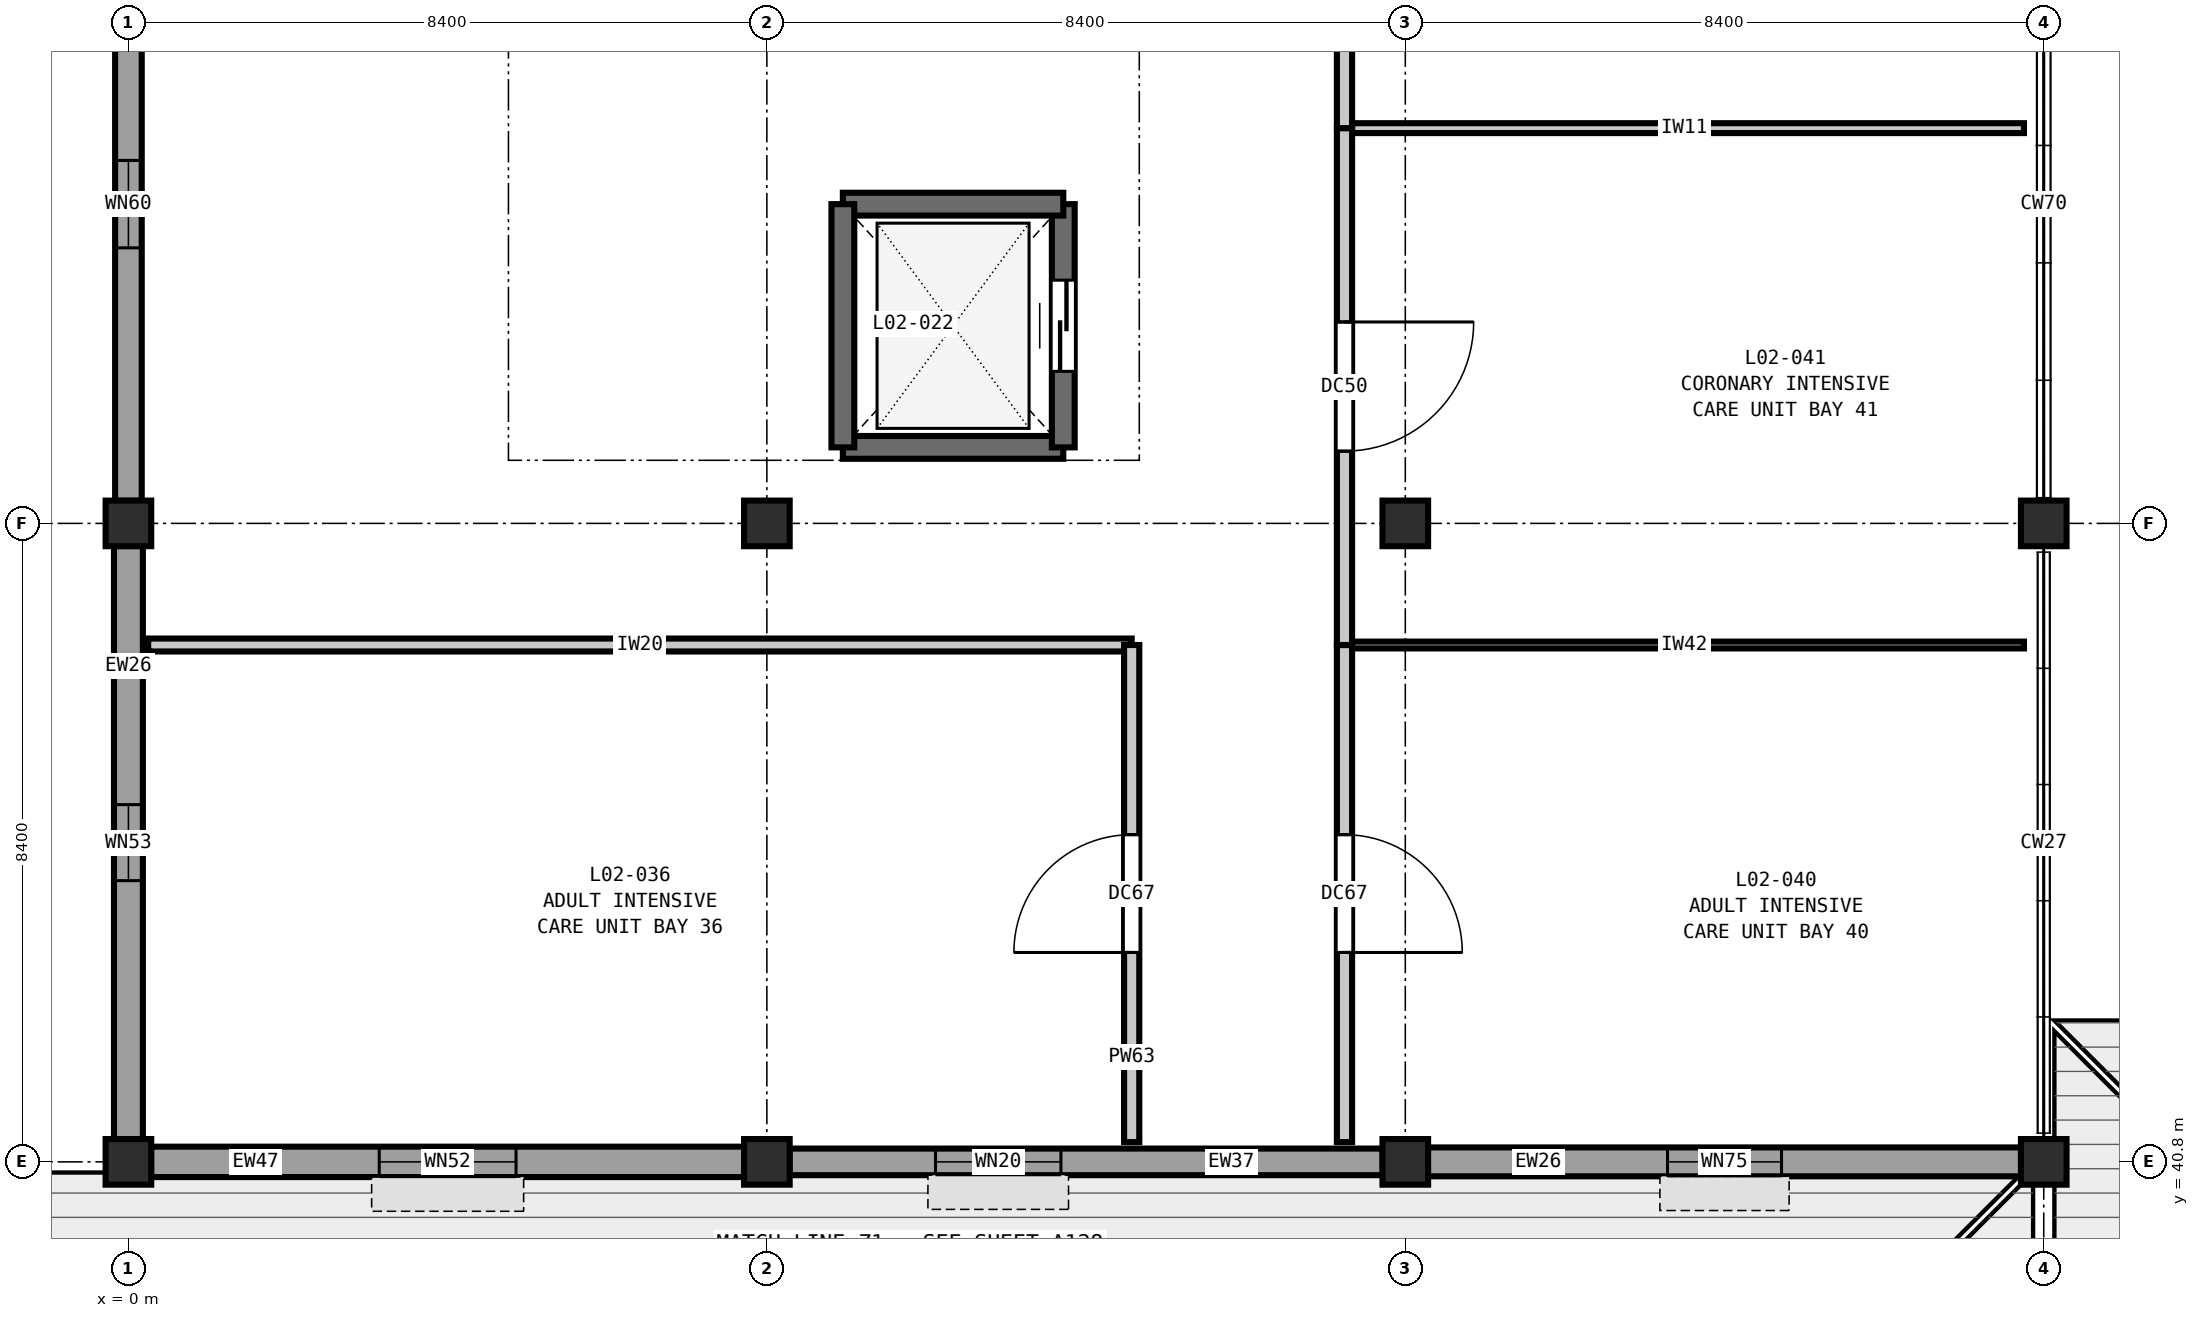
"""IFC4 building model, lengths in metres.
Left out: names, types, materials, properties, quantities, classifications, styles, units other than length and angle.
Written with IfcOpenShell. Run it as: python <this file> out.ifc"""

import sys

from ifc_helpers import new_model, si_unit, direction, frame, frame_2d, origin, origin_2d, place, context, subcontext, project, spatial, rectangle, extrude, element, fill, save


model = new_model("IFC4")
c1 = context("Model", 3, precision=1e-05, world=origin(), true_north=direction((0.0, 1.0)))
c2 = subcontext(c1, "Body", "Model", "MODEL_VIEW")
j1 = project(units=[si_unit("LENGTHUNIT", "METRE"), si_unit("PLANEANGLEUNIT", "RADIAN")], contexts=[c1])
p1 = place(None, origin())
s1 = spatial("IfcSite", under=j1, at=p1, CompositionType="ELEMENT")
p2 = place(p1, origin())
s2 = spatial("IfcBuilding", under=s1, at=p2, CompositionType="ELEMENT")
p3 = place(p2, frame((0.0, 0.0, 10.8)))
s3 = spatial("IfcBuildingStorey", under=s2, at=p3, CompositionType="ELEMENT", Elevation=10.8)
for number, where, z_axis, x_axis in (
    (1, (0.0, 40.8, 0.0), (0.0, 0.0, 1.0), (1.0, 0.0, 0.0)),
    (2, (0.0, 49.2, 0.0), (0.0, 0.0, 1.0), (1.0, 0.0, 0.0)),
    (3, (8.4, 40.8, 0.0), (0.0, 0.0, 1.0), (1.0, 0.0, 0.0)),
    (4, (8.4, 49.2, 0.0), (0.0, 0.0, 1.0), (1.0, 0.0, 0.0)),
    (5, (16.8, 40.8, 0.0), (0.0, 0.0, 1.0), (1.0, 0.0, 0.0)),
    (6, (16.8, 49.2, 0.0), (0.0, 0.0, 1.0), (1.0, 0.0, 0.0)),
    (7, (25.2, 40.8, 0.0), (0.0, 0.0, 1.0), (1.0, 0.0, 0.0)),
    (8, (25.2, 49.2, 0.0), (0.0, 0.0, 1.0), (1.0, 0.0, 0.0)),
):
    element("IfcColumn", number, at=place(p3, frame(where, z_axis=z_axis, x_axis=x_axis)), inside=s3, PredefinedType="COLUMN", context=c2, shape_type="SweptSolid", body=[
        extrude(rectangle(XDim=0.6, YDim=0.6, at=origin_2d()), origin(), (0.0, 0.0, 1.0), 5.4),
    ])
p4 = place(p3, frame((24.902, 40.8, 0.0), z_axis=(0.0, 0.0, 1.0), x_axis=(-1.0, 0.0, 0.0)))
e9 = element("IfcWall", 9, at=p4, inside=s3, PredefinedType="SOLIDWALL", context=c2, shape_type="SweptSolid", body=[
    extrude(rectangle(XDim=7.804, YDim=0.38, at=frame_2d((3.902, 0.0))), origin(), (0.0, 0.0, 1.0), 4.68),
])
p5 = place(p4, frame((3.152, 0.0, 0.9)))
e10 = element("IfcOpeningElement", 10, at=p5, cuts=e9, PredefinedType="OPENING", context=c2, shape_type="SweptSolid", body=[
    extrude(rectangle(XDim=1.5, YDim=1.55, at=frame_2d((0.75, 0.775))), frame((0.0, 0.2, 0.0), z_axis=(0.0, -1.0, 0.0), x_axis=(1.0, 0.0, 0.0)), (0.0, 0.0, 1.0), 0.4),
])
p6 = place(p3, frame((16.502, 40.8, 0.0), z_axis=(0.0, 0.0, 1.0), x_axis=(-1.0, 0.0, 0.0)))
e11 = element("IfcWall", 11, at=p6, inside=s3, PredefinedType="SOLIDWALL", context=c2, shape_type="SweptSolid", body=[
    extrude(rectangle(XDim=7.804, YDim=0.35, at=frame_2d((3.902, 0.0))), origin(), (0.0, 0.0, 1.0), 4.68),
])
p7 = place(p6, frame((4.233, 0.0, 0.9)))
e12 = element("IfcOpeningElement", 12, at=p7, cuts=e11, PredefinedType="OPENING", context=c2, shape_type="SweptSolid", body=[
    extrude(rectangle(XDim=1.65, YDim=1.55, at=frame_2d((0.825, 0.775))), frame((0.0, 0.185, 0.0), z_axis=(0.0, -1.0, 0.0), x_axis=(1.0, 0.0, 0.0)), (0.0, 0.0, 1.0), 0.37),
])
p8 = place(p3, frame((8.102, 40.8, 0.0), z_axis=(0.0, 0.0, 1.0), x_axis=(-1.0, 0.0, 0.0)))
e13 = element("IfcWall", 13, at=p8, inside=s3, PredefinedType="SOLIDWALL", context=c2, shape_type="SweptSolid", body=[
    extrude(rectangle(XDim=7.804, YDim=0.4, at=frame_2d((3.902, 0.0))), origin(), (0.0, 0.0, 1.0), 4.68),
])
p9 = place(p8, frame((3.002, 0.0, 0.9)))
e14 = element("IfcOpeningElement", 14, at=p9, cuts=e13, PredefinedType="OPENING", context=c2, shape_type="SweptSolid", body=[
    extrude(rectangle(XDim=1.8, YDim=1.55, at=frame_2d((0.9, 0.775))), frame((0.0, 0.21, 0.0), z_axis=(0.0, -1.0, 0.0), x_axis=(1.0, 0.0, 0.0)), (0.0, 0.0, 1.0), 0.42),
])
p10 = place(p3, frame((0.0, 41.098, 0.0), z_axis=(0.0, 0.0, 1.0), x_axis=(0.0, 1.0, 0.0)))
e15 = element("IfcWall", 15, at=p10, inside=s3, PredefinedType="SOLIDWALL", context=c2, shape_type="SweptSolid", body=[
    extrude(rectangle(XDim=7.804, YDim=0.38, at=frame_2d((3.902, 0.0))), origin(), (0.0, 0.0, 1.0), 4.68),
])
p11 = place(p10, frame((3.402, 0.0, 0.9)))
e16 = element("IfcOpeningElement", 16, at=p11, cuts=e15, PredefinedType="OPENING", context=c2, shape_type="SweptSolid", body=[
    extrude(rectangle(XDim=1.0, YDim=1.75, at=frame_2d((0.5, 0.875))), frame((0.0, 0.2, 0.0), z_axis=(0.0, -1.0, 0.0), x_axis=(1.0, 0.0, 0.0)), (0.0, 0.0, 1.0), 0.4),
])
p12 = place(p3, frame((0.0, 49.498, 0.0), z_axis=(0.0, 0.0, 1.0), x_axis=(0.0, 1.0, 0.0)))
e17 = element("IfcWall", 17, at=p12, inside=s3, PredefinedType="SOLIDWALL", context=c2, shape_type="SweptSolid", body=[
    extrude(rectangle(XDim=7.804, YDim=0.35, at=frame_2d((3.902, 0.0))), origin(), (0.0, 0.0, 1.0), 4.68),
])
p13 = place(p12, frame((3.327, 0.0, 0.9)))
e18 = element("IfcOpeningElement", 18, at=p13, cuts=e17, PredefinedType="OPENING", context=c2, shape_type="SweptSolid", body=[
    extrude(rectangle(XDim=1.15, YDim=1.75, at=frame_2d((0.575, 0.875))), frame((0.0, 0.185, 0.0), z_axis=(0.0, -1.0, 0.0), x_axis=(1.0, 0.0, 0.0)), (0.0, 0.0, 1.0), 0.37),
])
p14 = place(p3, frame((9.4, 50.2, 0.0), z_axis=(0.0, 0.0, 1.0), x_axis=(1.0, 0.0, 0.0)))
e19 = element("IfcWall", 19, at=p14, inside=s3, PredefinedType="SHEAR", context=c2, shape_type="SweptSolid", body=[
    extrude(rectangle(XDim=2.9, YDim=0.3, at=frame_2d((1.45, 0.0))), origin(), (0.0, 0.0, 1.0), 5.4),
])
p15 = place(p3, frame((12.3, 50.2, 0.0), z_axis=(0.0, 0.0, 1.0), x_axis=(0.0, 1.0, 0.0)))
e20 = element("IfcWall", 20, at=p15, inside=s3, PredefinedType="SHEAR", context=c2, shape_type="SweptSolid", body=[
    extrude(rectangle(XDim=3.2, YDim=0.3, at=frame_2d((1.6, 0.0))), origin(), (0.0, 0.0, 1.0), 5.4),
])
p16 = place(p15, frame((1.0, 0.0, 0.0)))
e21 = element("IfcOpeningElement", 21, at=p16, cuts=e20, PredefinedType="OPENING", context=c2, shape_type="SweptSolid", body=[
    extrude(rectangle(XDim=1.2, YDim=2.2, at=frame_2d((0.6, 1.1))), frame((0.0, 0.16, 0.0), z_axis=(0.0, -1.0, 0.0), x_axis=(1.0, 0.0, 0.0)), (0.0, 0.0, 1.0), 0.32),
])
p17 = place(p3, frame((12.3, 53.4, 0.0), z_axis=(0.0, 0.0, 1.0), x_axis=(-1.0, 0.0, 0.0)))
e22 = element("IfcWall", 22, at=p17, inside=s3, PredefinedType="SHEAR", context=c2, shape_type="SweptSolid", body=[
    extrude(rectangle(XDim=2.9, YDim=0.3, at=frame_2d((1.45, 0.0))), origin(), (0.0, 0.0, 1.0), 5.4),
])
p18 = place(p3, frame((9.4, 53.4, 0.0), z_axis=(0.0, 0.0, 1.0), x_axis=(0.0, -1.0, 0.0)))
e23 = element("IfcWall", 23, at=p18, inside=s3, PredefinedType="SHEAR", context=c2, shape_type="SweptSolid", body=[
    extrude(rectangle(XDim=3.2, YDim=0.3, at=frame_2d((1.6, 0.0))), origin(), (0.0, 0.0, 1.0), 5.4),
])
p19 = place(p3, frame((0.26, 47.6, 0.0), z_axis=(0.0, 0.0, 1.0), x_axis=(1.0, 0.0, 0.0)))
e24 = element("IfcWall", 24, at=p19, inside=s3, PredefinedType="PARTITIONING", context=c2, shape_type="SweptSolid", body=[
    extrude(rectangle(XDim=12.94, YDim=0.17, at=frame_2d((6.47, 0.0))), origin(), (0.0, 0.0, 1.0), 5.07),
])
p20 = place(p3, frame((16.0, 47.6, 0.0), z_axis=(0.0, 0.0, 1.0), x_axis=(1.0, 0.0, 0.0)))
e25 = element("IfcWall", 25, at=p20, inside=s3, PredefinedType="PARTITIONING", context=c2, shape_type="SweptSolid", body=[
    extrude(rectangle(XDim=8.94, YDim=0.09, at=frame_2d((4.47, 0.0))), origin(), (0.0, 0.0, 1.0), 5.07),
])
p21 = place(p3, frame((16.0, 54.4, 0.0), z_axis=(0.0, 0.0, 1.0), x_axis=(1.0, 0.0, 0.0)))
e26 = element("IfcWall", 26, at=p21, inside=s3, PredefinedType="PARTITIONING", context=c2, shape_type="SweptSolid", body=[
    extrude(rectangle(XDim=8.94, YDim=0.13, at=frame_2d((4.47, 0.0))), origin(), (0.0, 0.0, 1.0), 5.07),
])
p22 = place(p3, frame((13.2, 41.06, 0.0), z_axis=(0.0, 0.0, 1.0), x_axis=(0.0, 1.0, 0.0)))
e27 = element("IfcWall", 27, at=p22, inside=s3, PredefinedType="PARTITIONING", context=c2, shape_type="SweptSolid", body=[
    extrude(rectangle(XDim=6.54, YDim=0.2, at=frame_2d((3.27, 0.0))), origin(), (0.0, 0.0, 1.0), 5.07),
])
p23 = place(p22, frame((2.495, 0.0, 0.0)))
e28 = element("IfcOpeningElement", 28, at=p23, cuts=e27, PredefinedType="OPENING", context=c2, shape_type="SweptSolid", body=[
    extrude(rectangle(XDim=1.55, YDim=2.25, at=frame_2d((0.775, 1.125))), frame((0.0, 0.11, 0.0), z_axis=(0.0, -1.0, 0.0), x_axis=(1.0, 0.0, 0.0)), (0.0, 0.0, 1.0), 0.22),
])
p24 = place(p3, frame((16.0, 41.06, 0.0), z_axis=(0.0, 0.0, 1.0), x_axis=(0.0, 1.0, 0.0)))
e29 = element("IfcWall", 29, at=p24, inside=s3, PredefinedType="PARTITIONING", context=c2, shape_type="SweptSolid", body=[
    extrude(rectangle(XDim=6.54, YDim=0.2, at=frame_2d((3.27, 0.0))), origin(), (0.0, 0.0, 1.0), 5.07),
])
p25 = place(p24, frame((2.495, 0.0, 0.0)))
e30 = element("IfcOpeningElement", 30, at=p25, cuts=e29, PredefinedType="OPENING", context=c2, shape_type="SweptSolid", body=[
    extrude(rectangle(XDim=1.55, YDim=2.25, at=frame_2d((0.775, 1.125))), frame((0.0, 0.11, 0.0), z_axis=(0.0, -1.0, 0.0), x_axis=(1.0, 0.0, 0.0)), (0.0, 0.0, 1.0), 0.22),
])
p26 = place(p3, frame((16.0, 47.6, 0.0), z_axis=(0.0, 0.0, 1.0), x_axis=(0.0, 1.0, 0.0)))
e31 = element("IfcWall", 31, at=p26, inside=s3, PredefinedType="PARTITIONING", context=c2, shape_type="SweptSolid", body=[
    extrude(rectangle(XDim=6.8, YDim=0.2, at=frame_2d((3.4, 0.0))), origin(), (0.0, 0.0, 1.0), 5.07),
])
p27 = place(p26, frame((2.55, 0.0, 0.0)))
e32 = element("IfcOpeningElement", 32, at=p27, cuts=e31, PredefinedType="OPENING", context=c2, shape_type="SweptSolid", body=[
    extrude(rectangle(XDim=1.7, YDim=2.3, at=frame_2d((0.85, 1.15))), frame((0.0, 0.11, 0.0), z_axis=(0.0, -1.0, 0.0), x_axis=(1.0, 0.0, 0.0)), (0.0, 0.0, 1.0), 0.22),
])
p28 = place(p3, frame((16.0, 54.4, 0.0), z_axis=(0.0, 0.0, 1.0), x_axis=(0.0, 1.0, 0.0)))
e33 = element("IfcWall", 33, at=p28, inside=s3, PredefinedType="PARTITIONING", context=c2, shape_type="SweptSolid", body=[
    extrude(rectangle(XDim=6.8, YDim=0.2, at=frame_2d((3.4, 0.0))), origin(), (0.0, 0.0, 1.0), 5.07),
])
p29 = place(p28, frame((3.816, 0.0, 0.0)))
e34 = element("IfcOpeningElement", 34, at=p29, cuts=e33, PredefinedType="OPENING", context=c2, shape_type="SweptSolid", body=[
    extrude(rectangle(XDim=1.85, YDim=2.3, at=frame_2d((0.925, 1.15))), frame((0.0, 0.11, 0.0), z_axis=(0.0, -1.0, 0.0), x_axis=(1.0, 0.0, 0.0)), (0.0, 0.0, 1.0), 0.22),
])
p30 = place(p5, origin())
e35 = element("IfcWindow", 35, at=p30, inside=s3, PartitioningType="SINGLE_PANEL", PredefinedType="WINDOW", context=c2, shape_type="SweptSolid", body=[
    extrude(rectangle(XDim=1.5, YDim=1.55, at=frame_2d((0.75, 0.775))), frame((0.0, 0.03, 0.0), z_axis=(0.0, -1.0, 0.0), x_axis=(1.0, 0.0, 0.0)), (0.0, 0.0, 1.0), 0.06),
])
fill(e10, e35)
p31 = place(p7, origin())
e36 = element("IfcWindow", 36, at=p31, inside=s3, PartitioningType="DOUBLE_PANEL_VERTICAL", PredefinedType="WINDOW", context=c2, shape_type="SweptSolid", body=[
    extrude(rectangle(XDim=1.65, YDim=1.55, at=frame_2d((0.825, 0.775))), frame((0.0, 0.03, 0.0), z_axis=(0.0, -1.0, 0.0), x_axis=(1.0, 0.0, 0.0)), (0.0, 0.0, 1.0), 0.06),
])
fill(e12, e36)
p32 = place(p9, origin())
e37 = element("IfcWindow", 37, at=p32, inside=s3, PartitioningType="DOUBLE_PANEL_VERTICAL", PredefinedType="WINDOW", context=c2, shape_type="SweptSolid", body=[
    extrude(rectangle(XDim=1.8, YDim=1.55, at=frame_2d((0.9, 0.775))), frame((0.0, 0.03, 0.0), z_axis=(0.0, -1.0, 0.0), x_axis=(1.0, 0.0, 0.0)), (0.0, 0.0, 1.0), 0.06),
])
fill(e14, e37)
p33 = place(p11, origin())
e38 = element("IfcWindow", 38, at=p33, inside=s3, PartitioningType="SINGLE_PANEL", PredefinedType="WINDOW", context=c2, shape_type="SweptSolid", body=[
    extrude(rectangle(XDim=1.0, YDim=1.75, at=frame_2d((0.5, 0.875))), frame((0.0, 0.03, 0.0), z_axis=(0.0, -1.0, 0.0), x_axis=(1.0, 0.0, 0.0)), (0.0, 0.0, 1.0), 0.06),
])
fill(e16, e38)
p34 = place(p13, origin())
e39 = element("IfcWindow", 39, at=p34, inside=s3, PartitioningType="SINGLE_PANEL", PredefinedType="WINDOW", context=c2, shape_type="SweptSolid", body=[
    extrude(rectangle(XDim=1.15, YDim=1.75, at=frame_2d((0.575, 0.875))), frame((0.0, 0.03, 0.0), z_axis=(0.0, -1.0, 0.0), x_axis=(1.0, 0.0, 0.0)), (0.0, 0.0, 1.0), 0.06),
])
fill(e18, e39)
p35 = place(p16, origin())
e40 = element("IfcDoor", 40, at=p35, inside=s3, OperationType="DOUBLE_DOOR_SLIDING", PredefinedType="DOOR", context=c2, shape_type="SweptSolid", body=[
    extrude(rectangle(XDim=1.2, YDim=2.2, at=frame_2d((0.6, 1.1))), frame((0.0, 0.025, 0.0), z_axis=(0.0, -1.0, 0.0), x_axis=(1.0, 0.0, 0.0)), (0.0, 0.0, 1.0), 0.05),
])
fill(e21, e40)
p36 = place(p23, origin())
e41 = element("IfcDoor", 41, at=p36, inside=s3, OperationType="SINGLE_SWING_LEFT", PredefinedType="DOOR", context=c2, shape_type="SweptSolid", body=[
    extrude(rectangle(XDim=1.55, YDim=2.25, at=frame_2d((0.775, 1.125))), frame((0.0, 0.025, 0.0), z_axis=(0.0, -1.0, 0.0), x_axis=(1.0, 0.0, 0.0)), (0.0, 0.0, 1.0), 0.05),
])
fill(e28, e41)
p37 = place(p25, frame((1.55, 0.0, 0.0), z_axis=(0.0, 0.0, 1.0), x_axis=(-1.0, 0.0, 0.0)))
e42 = element("IfcDoor", 42, at=p37, inside=s3, OperationType="SINGLE_SWING_RIGHT", PredefinedType="DOOR", context=c2, shape_type="SweptSolid", body=[
    extrude(rectangle(XDim=1.55, YDim=2.25, at=frame_2d((0.775, 1.125))), frame((0.0, 0.025, 0.0), z_axis=(0.0, -1.0, 0.0), x_axis=(1.0, 0.0, 0.0)), (0.0, 0.0, 1.0), 0.05),
])
fill(e30, e42)
p38 = place(p27, frame((1.7, 0.0, 0.0), z_axis=(0.0, 0.0, 1.0), x_axis=(-1.0, 0.0, 0.0)))
e43 = element("IfcDoor", 43, at=p38, inside=s3, OperationType="SINGLE_SWING_LEFT", PredefinedType="DOOR", context=c2, shape_type="SweptSolid", body=[
    extrude(rectangle(XDim=1.7, YDim=2.3, at=frame_2d((0.85, 1.15))), frame((0.0, 0.025, 0.0), z_axis=(0.0, -1.0, 0.0), x_axis=(1.0, 0.0, 0.0)), (0.0, 0.0, 1.0), 0.05),
])
fill(e32, e43)
save(model, sys.argv[1])
